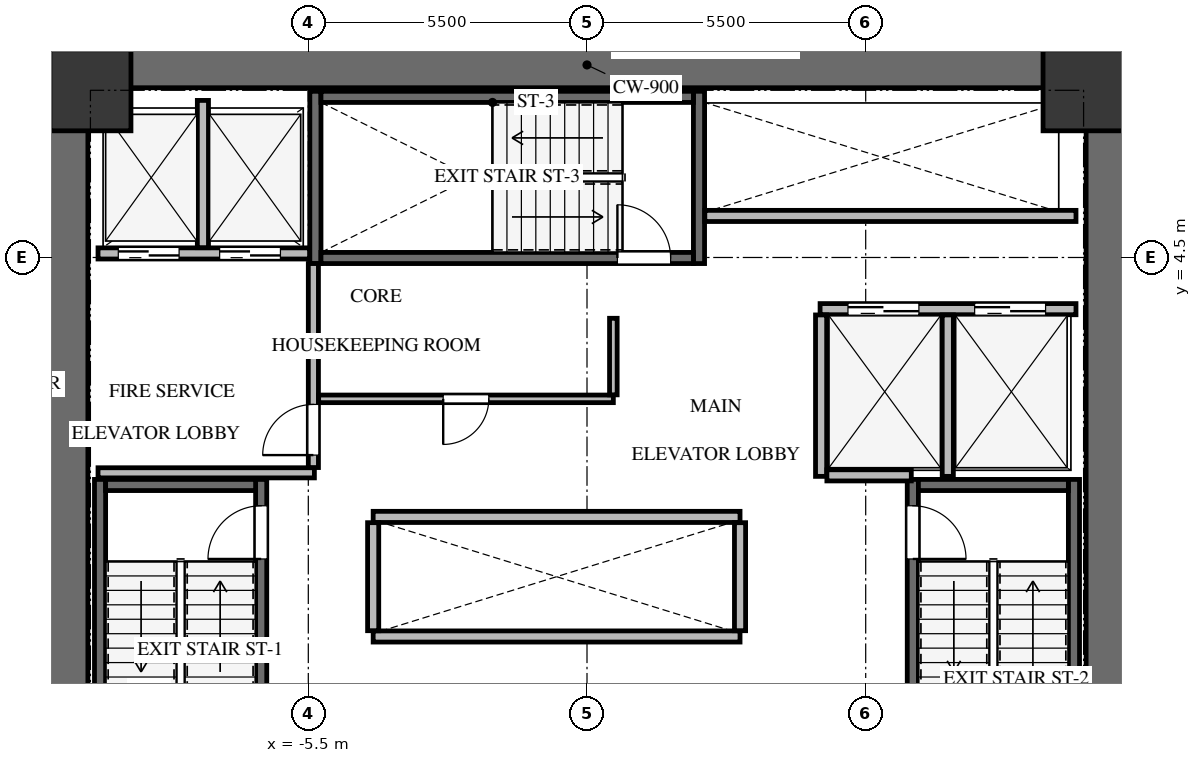
"""IFC4 building model, lengths in metres.
Left out: names, types, materials, properties, quantities, classifications, styles, units other than length and angle.
Written with IfcOpenShell. Run it as: python <this file> out.ifc"""

import sys

from ifc_helpers import new_model, si_unit, direction, frame, frame_2d, origin, origin_2d, place, context, subcontext, project, spatial, rectangle, extrude, source, transform, mapped, element, fill, save


model = new_model("IFC4")
c1 = context("Model", 3, precision=1e-05, world=origin(), true_north=direction((0.0, 1.0)))
c2 = subcontext(c1, "Body", "Model", "MODEL_VIEW")
j1 = project(units=[si_unit("LENGTHUNIT", "METRE"), si_unit("PLANEANGLEUNIT", "RADIAN")], contexts=[c1])
p1 = place(None, origin())
s1 = spatial("IfcSite", under=j1, at=p1, CompositionType="ELEMENT")
p2 = place(p1, origin())
s2 = spatial("IfcBuilding", under=s1, at=p2, CompositionType="ELEMENT")
p3 = place(p2, frame((0.0, 0.0, 45.6)))
s3 = spatial("IfcBuildingStorey", under=s2, at=p3, CompositionType="ELEMENT", Elevation=45.6)
for number, where, z_axis, x_axis in (
    (1, (-10.3, -8.75, 0.0), (0.0, 0.0, 1.0), (0.0, 1.0, 0.0)),
    (2, (10.3, -8.75, 0.0), (0.0, 0.0, 1.0), (0.0, 1.0, 0.0)),
):
    element("IfcWall", number, at=place(p3, frame(where, z_axis=z_axis, x_axis=x_axis)), inside=s3, PredefinedType="SHEAR", context=c2, shape_type="SweptSolid", body=[
        extrude(rectangle(XDim=17.5, YDim=0.9, at=frame_2d((8.75, 0.0))), origin(), (0.0, 0.0, 1.0), 3.3),
    ])
p4 = place(p3, frame((-9.85, 8.3, 0.0), z_axis=(0.0, 0.0, 1.0), x_axis=(1.0, 0.0, 0.0)))
e3 = element("IfcWall", 3, at=p4, inside=s3, PredefinedType="SHEAR", context=c2, shape_type="SweptSolid", body=[
    extrude(rectangle(XDim=19.7, YDim=0.9, at=frame_2d((9.85, 0.0))), origin(), (0.0, 0.0, 1.0), 3.3),
])
p5 = place(p3, frame((-6.43, -7.77, -0.24), z_axis=(0.0, 0.0, 1.0), x_axis=(0.0, 1.0, 0.0)))
e4 = element("IfcWall", 4, at=p5, inside=s3, PredefinedType="SHEAR", context=c2, shape_type="SweptSolid", body=[
    extrude(rectangle(XDim=7.89, YDim=0.22, at=frame_2d((3.945, 0.0))), origin(), (0.0, 0.0, 1.0), 3.3),
])
p6 = place(p5, frame((6.32, 0.0, 0.0)))
e5 = element("IfcOpeningElement", 5, at=p6, cuts=e4, PredefinedType="OPENING", context=c2, shape_type="SweptSolid", body=[
    extrude(rectangle(XDim=1.05, YDim=2.15, at=frame_2d((0.525, 1.075))), frame((0.0, 0.12, 0.0), z_axis=(0.0, -1.0, 0.0), x_axis=(1.0, 0.0, 0.0)), (0.0, 0.0, 1.0), 0.24),
])
p7 = place(p3, frame((-9.61, 0.12, -0.24), z_axis=(0.0, 0.0, 1.0), x_axis=(0.0, -1.0, 0.0)))
e6 = element("IfcWall", 6, at=p7, inside=s3, PredefinedType="SHEAR", context=c2, shape_type="SweptSolid", body=[
    extrude(rectangle(XDim=7.89, YDim=0.22, at=frame_2d((3.945, 0.0))), origin(), (0.0, 0.0, 1.0), 3.3),
])
p8 = place(p3, frame((-6.54, 0.01, -0.24), z_axis=(0.0, 0.0, 1.0), x_axis=(-1.0, 0.0, 0.0)))
e7 = element("IfcWall", 7, at=p8, inside=s3, PredefinedType="SHEAR", context=c2, shape_type="SweptSolid", body=[
    extrude(rectangle(XDim=2.96, YDim=0.22, at=frame_2d((1.48, 0.0))), origin(), (0.0, 0.0, 1.0), 3.3),
])
p9 = place(p3, frame((9.61, -7.77, -0.24), z_axis=(0.0, 0.0, 1.0), x_axis=(0.0, 1.0, 0.0)))
e8 = element("IfcWall", 8, at=p9, inside=s3, PredefinedType="SHEAR", context=c2, shape_type="SweptSolid", body=[
    extrude(rectangle(XDim=7.89, YDim=0.22, at=frame_2d((3.945, 0.0))), origin(), (0.0, 0.0, 1.0), 3.3),
])
p10 = place(p3, frame((6.43, 0.12, -0.24), z_axis=(0.0, 0.0, 1.0), x_axis=(0.0, -1.0, 0.0)))
e9 = element("IfcWall", 9, at=p10, inside=s3, PredefinedType="SHEAR", context=c2, shape_type="SweptSolid", body=[
    extrude(rectangle(XDim=7.89, YDim=0.22, at=frame_2d((3.945, 0.0))), origin(), (0.0, 0.0, 1.0), 3.3),
])
p11 = place(p10, frame((0.52, 0.0, 0.0)))
e10 = element("IfcOpeningElement", 10, at=p11, cuts=e9, PredefinedType="OPENING", context=c2, shape_type="SweptSolid", body=[
    extrude(rectangle(XDim=1.05, YDim=2.15, at=frame_2d((0.525, 1.075))), frame((0.0, 0.12, 0.0), z_axis=(0.0, -1.0, 0.0), x_axis=(1.0, 0.0, 0.0)), (0.0, 0.0, 1.0), 0.24),
])
p12 = place(p3, frame((9.5, 0.01, -0.24), z_axis=(0.0, 0.0, 1.0), x_axis=(-1.0, 0.0, 0.0)))
e11 = element("IfcWall", 11, at=p12, inside=s3, PredefinedType="SHEAR", context=c2, shape_type="SweptSolid", body=[
    extrude(rectangle(XDim=2.96, YDim=0.22, at=frame_2d((1.48, 0.0))), origin(), (0.0, 0.0, 1.0), 3.3),
])
for number, where, z_axis, x_axis in (
    (12, (2.21, 4.38, -0.24), (0.0, 0.0, 1.0), (0.0, 1.0, 0.0)),
    (13, (-5.36, 7.78, -0.24), (0.0, 0.0, 1.0), (0.0, -1.0, 0.0)),
):
    element("IfcWall", number, at=place(p3, frame(where, z_axis=z_axis, x_axis=x_axis)), inside=s3, PredefinedType="SHEAR", context=c2, shape_type="SweptSolid", body=[
        extrude(rectangle(XDim=3.4, YDim=0.22, at=frame_2d((1.7, 0.0))), origin(), (0.0, 0.0, 1.0), 3.3),
    ])
p13 = place(p3, frame((-5.25, 4.49, -0.24), z_axis=(0.0, 0.0, 1.0), x_axis=(1.0, 0.0, 0.0)))
e14 = element("IfcWall", 14, at=p13, inside=s3, PredefinedType="SHEAR", context=c2, shape_type="SweptSolid", body=[
    extrude(rectangle(XDim=7.35, YDim=0.22, at=frame_2d((3.675, 0.0))), origin(), (0.0, 0.0, 1.0), 3.3),
])
p14 = place(p13, frame((5.85, 0.0, 0.0)))
e15 = element("IfcOpeningElement", 15, at=p14, cuts=e14, PredefinedType="OPENING", context=c2, shape_type="SweptSolid", body=[
    extrude(rectangle(XDim=1.05, YDim=2.15, at=frame_2d((0.525, 1.075))), frame((0.0, 0.12, 0.0), z_axis=(0.0, -1.0, 0.0), x_axis=(1.0, 0.0, 0.0)), (0.0, 0.0, 1.0), 0.24),
])
p15 = place(p3, frame((2.1, 7.67, -0.24), z_axis=(0.0, 0.0, 1.0), x_axis=(-1.0, 0.0, 0.0)))
e16 = element("IfcWall", 16, at=p15, inside=s3, PredefinedType="SHEAR", context=c2, shape_type="SweptSolid", body=[
    extrude(rectangle(XDim=7.35, YDim=0.22, at=frame_2d((3.675, 0.0))), origin(), (0.0, 0.0, 1.0), 3.3),
])
m1 = source(origin(), c2, "Body", "SweptSolid", [
    extrude(rectangle(XDim=1.6, YDim=1.6, at=origin_2d()), origin(), (0.0, 0.0, 1.0), 3.3),
])
for number, where, z_axis, x_axis in (
    (17, (9.8, 7.8, -0.24), (0.0, 0.0, 1.0), (1.0, 0.0, 0.0)),
    (18, (-9.8, 7.8, -0.24), (0.0, 0.0, 1.0), (1.0, 0.0, 0.0)),
):
    element("IfcColumn", number, at=place(p3, frame(where, z_axis=z_axis, x_axis=x_axis)), inside=s3, PredefinedType="COLUMN", context=c2, shape_type="MappedRepresentation", body=[
        mapped(m1, transform((0.0, 0.0, 0.0), x_axis=(1.0, 0.0, 0.0), y_axis=(0.0, 1.0, 0.0), z_axis=(0.0, 0.0, 1.0), scale=1.0)),
    ])
p16 = place(p3, frame((-9.65, 4.58, 0.0), z_axis=(0.0, 0.0, 1.0), x_axis=(1.0, 0.0, 0.0)))
e19 = element("IfcWall", 19, at=p16, inside=s3, PredefinedType="SOLIDWALL", context=c2, shape_type="SweptSolid", body=[
    extrude(rectangle(XDim=4.175, YDim=0.22, at=frame_2d((2.087, 0.0))), origin(), (0.0, 0.0, 1.0), 3.045),
])
p17 = place(p16, frame((0.4, 0.0, 0.0)))
e20 = element("IfcOpeningElement", 20, at=p17, cuts=e19, PredefinedType="OPENING", context=c2, shape_type="SweptSolid", body=[
    extrude(rectangle(XDim=1.2, YDim=2.15, at=frame_2d((0.6, 1.075))), frame((0.0, 0.12, 0.0), z_axis=(0.0, -1.0, 0.0), x_axis=(1.0, 0.0, 0.0)), (0.0, 0.0, 1.0), 0.24),
])
p18 = place(p16, frame((2.4, 0.0, 0.0)))
e21 = element("IfcOpeningElement", 21, at=p18, cuts=e19, PredefinedType="OPENING", context=c2, shape_type="SweptSolid", body=[
    extrude(rectangle(XDim=1.2, YDim=2.15, at=frame_2d((0.6, 1.075))), frame((0.0, 0.12, 0.0), z_axis=(0.0, -1.0, 0.0), x_axis=(1.0, 0.0, 0.0)), (0.0, 0.0, 1.0), 0.24),
])
p19 = place(p3, frame((-7.58, 4.694, 0.0), z_axis=(0.0, 0.0, 1.0), x_axis=(0.0, 1.0, 0.0)))
e22 = element("IfcWall", 22, at=p19, inside=s3, PredefinedType="SOLIDWALL", context=c2, shape_type="SweptSolid", body=[
    extrude(rectangle(XDim=2.906, YDim=0.22, at=frame_2d((1.453, 0.0))), origin(), (0.0, 0.0, 1.0), 3.045),
])
p20 = place(p3, frame((-9.65, 0.25, 0.0), z_axis=(0.0, 0.0, 1.0), x_axis=(1.0, 0.0, 0.0)))
e23 = element("IfcWall", 23, at=p20, inside=s3, PredefinedType="SOLIDWALL", context=c2, shape_type="SweptSolid", body=[
    extrude(rectangle(XDim=4.27, YDim=0.2, at=frame_2d((2.135, 0.0))), origin(), (0.0, 0.0, 1.0), 3.045),
])
p21 = place(p3, frame((-5.4, 0.354, 0.0), z_axis=(0.0, 0.0, 1.0), x_axis=(0.0, 1.0, 0.0)))
e24 = element("IfcWall", 24, at=p21, inside=s3, PredefinedType="SOLIDWALL", context=c2, shape_type="SweptSolid", body=[
    extrude(rectangle(XDim=4.026, YDim=0.2, at=frame_2d((2.013, 0.0))), origin(), (0.0, 0.0, 1.0), 3.045),
])
p22 = place(p21, frame((0.246, 0.0, 0.0)))
e25 = element("IfcOpeningElement", 25, at=p22, cuts=e24, PredefinedType="OPENING", context=c2, shape_type="SweptSolid", body=[
    extrude(rectangle(XDim=1.0, YDim=2.15, at=frame_2d((0.5, 1.075))), frame((0.0, 0.11, 0.0), z_axis=(0.0, -1.0, 0.0), x_axis=(1.0, 0.0, 0.0)), (0.0, 0.0, 1.0), 0.22),
])
p23 = place(p3, frame((4.6, 3.48, 0.0), z_axis=(0.0, 0.0, 1.0), x_axis=(1.0, 0.0, 0.0)))
e26 = element("IfcWall", 26, at=p23, inside=s3, PredefinedType="SOLIDWALL", context=c2, shape_type="SweptSolid", body=[
    extrude(rectangle(XDim=5.05, YDim=0.22, at=frame_2d((2.525, 0.0))), origin(), (0.0, 0.0, 1.0), 3.045),
])
p24 = place(p23, frame((0.55, 0.0, 0.0)))
e27 = element("IfcOpeningElement", 27, at=p24, cuts=e26, PredefinedType="OPENING", context=c2, shape_type="SweptSolid", body=[
    extrude(rectangle(XDim=1.4, YDim=2.15, at=frame_2d((0.7, 1.075))), frame((0.0, 0.12, 0.0), z_axis=(0.0, -1.0, 0.0), x_axis=(1.0, 0.0, 0.0)), (0.0, 0.0, 1.0), 0.24),
])
p25 = place(p23, frame((3.05, 0.0, 0.0)))
e28 = element("IfcOpeningElement", 28, at=p25, cuts=e26, PredefinedType="OPENING", context=c2, shape_type="SweptSolid", body=[
    extrude(rectangle(XDim=1.4, YDim=2.15, at=frame_2d((0.7, 1.075))), frame((0.0, 0.12, 0.0), z_axis=(0.0, -1.0, 0.0), x_axis=(1.0, 0.0, 0.0)), (0.0, 0.0, 1.0), 0.24),
])
for number, where, z_axis, x_axis in (
    (29, (4.62, 0.18, 0.0), (0.0, 0.0, 1.0), (0.0, 1.0, 0.0)),
    (30, (7.12, 0.18, 0.0), (0.0, 0.0, 1.0), (0.0, 1.0, 0.0)),
):
    element("IfcWall", number, at=place(p3, frame(where, z_axis=z_axis, x_axis=x_axis)), inside=s3, PredefinedType="SOLIDWALL", context=c2, shape_type="SweptSolid", body=[
        extrude(rectangle(XDim=3.186, YDim=0.22, at=frame_2d((1.593, 0.0))), origin(), (0.0, 0.0, 1.0), 3.045),
    ])
p26 = place(p3, frame((4.734, 0.2, 0.0), z_axis=(0.0, 0.0, 1.0), x_axis=(1.0, 0.0, 0.0)))
e31 = element("IfcWall", 31, at=p26, inside=s3, PredefinedType="SOLIDWALL", context=c2, shape_type="SweptSolid", body=[
    extrude(rectangle(XDim=1.666, YDim=0.22, at=frame_2d((0.833, 0.0))), origin(), (0.0, 0.0, 1.0), 3.045),
])
for number, where, z_axis, x_axis in (
    (32, (-4.22, -2.98, 0.0), (0.0, 0.0, 1.0), (1.0, 0.0, 0.0)),
    (33, (-4.22, -0.62, 0.0), (0.0, 0.0, 1.0), (1.0, 0.0, 0.0)),
):
    element("IfcWall", number, at=place(p3, frame(where, z_axis=z_axis, x_axis=x_axis)), inside=s3, PredefinedType="SOLIDWALL", context=c2, shape_type="SweptSolid", body=[
        extrude(rectangle(XDim=7.24, YDim=0.22, at=frame_2d((3.62, 0.0))), origin(), (0.0, 0.0, 1.0), 3.045),
    ])
for number, where, z_axis, x_axis in (
    (34, (-4.22, -2.866, 0.0), (0.0, 0.0, 1.0), (0.0, 1.0, 0.0)),
    (35, (3.02, -2.866, 0.0), (0.0, 0.0, 1.0), (0.0, 1.0, 0.0)),
):
    element("IfcWall", number, at=place(p3, frame(where, z_axis=z_axis, x_axis=x_axis)), inside=s3, PredefinedType="SOLIDWALL", context=c2, shape_type="SweptSolid", body=[
        extrude(rectangle(XDim=2.132, YDim=0.22, at=frame_2d((1.066, 0.0))), origin(), (0.0, 0.0, 1.0), 3.045),
    ])
p27 = place(p3, frame((2.325, 5.32, 0.0), z_axis=(0.0, 0.0, 1.0), x_axis=(1.0, 0.0, 0.0)))
e36 = element("IfcWall", 36, at=p27, inside=s3, PredefinedType="SOLIDWALL", context=c2, shape_type="SweptSolid", body=[
    extrude(rectangle(XDim=7.325, YDim=0.22, at=frame_2d((3.663, 0.0))), origin(), (0.0, 0.0, 1.0), 3.045),
])
p28 = place(p3, frame((0.52, 1.71, 0.0), z_axis=(0.0, 0.0, 1.0), x_axis=(-1.0, 0.0, 0.0)))
e37 = element("IfcWall", 37, at=p28, inside=s3, PredefinedType="PARTITIONING", context=c2, shape_type="SweptSolid", body=[
    extrude(rectangle(XDim=5.816, YDim=0.15, at=frame_2d((2.908, 0.0))), origin(), (0.0, 0.0, 1.0), 3.045),
])
p29 = place(p28, frame((2.458, 0.0, 0.0)))
e38 = element("IfcOpeningElement", 38, at=p29, cuts=e37, PredefinedType="OPENING", context=c2, shape_type="SweptSolid", body=[
    extrude(rectangle(XDim=0.9, YDim=2.05, at=frame_2d((0.45, 1.025))), frame((0.0, 0.085, 0.0), z_axis=(0.0, -1.0, 0.0), x_axis=(1.0, 0.0, 0.0)), (0.0, 0.0, 1.0), 0.17),
])
p30 = place(p3, frame((0.52, 3.3, 0.0), z_axis=(0.0, 0.0, 1.0), x_axis=(0.0, -1.0, 0.0)))
e39 = element("IfcWall", 39, at=p30, inside=s3, PredefinedType="PARTITIONING", context=c2, shape_type="SweptSolid", body=[
    extrude(rectangle(XDim=1.511, YDim=0.15, at=frame_2d((0.755, 0.0))), origin(), (0.0, 0.0, 1.0), 3.045),
])
m2 = source(origin(), c2, "Body", "SweptSolid", [
    extrude(rectangle(XDim=1.05, YDim=2.15, at=frame_2d((0.525, 1.075))), frame((0.0, 0.025, 0.0), z_axis=(0.0, -1.0, 0.0), x_axis=(1.0, 0.0, 0.0)), (0.0, 0.0, 1.0), 0.05),
])
p31 = place(p6, origin())
e40 = element("IfcDoor", 40, at=p31, inside=s3, OperationType="SINGLE_SWING_LEFT", PredefinedType="DOOR", context=c2, shape_type="MappedRepresentation", body=[
    mapped(m2, transform((0.0, 0.0, 0.0), x_axis=(1.0, 0.0, 0.0), y_axis=(0.0, 1.0, 0.0), z_axis=(0.0, 0.0, 1.0), scale=1.0)),
])
fill(e5, e40)
m3 = source(origin(), c2, "Body", "SweptSolid", [
    extrude(rectangle(XDim=1.05, YDim=2.15, at=frame_2d((0.525, 1.075))), frame((0.0, 0.025, 0.0), z_axis=(0.0, -1.0, 0.0), x_axis=(1.0, 0.0, 0.0)), (0.0, 0.0, 1.0), 0.05),
])
p32 = place(p11, origin())
e41 = element("IfcDoor", 41, at=p32, inside=s3, OperationType="SINGLE_SWING_RIGHT", PredefinedType="DOOR", context=c2, shape_type="MappedRepresentation", body=[
    mapped(m3, transform((0.0, 0.0, 0.0), x_axis=(1.0, 0.0, 0.0), y_axis=(0.0, 1.0, 0.0), z_axis=(0.0, 0.0, 1.0), scale=1.0)),
])
fill(e10, e41)
p33 = place(p14, origin())
e42 = element("IfcDoor", 42, at=p33, inside=s3, OperationType="SINGLE_SWING_LEFT", PredefinedType="DOOR", context=c2, shape_type="MappedRepresentation", body=[
    mapped(m2, transform((0.0, 0.0, 0.0), x_axis=(1.0, 0.0, 0.0), y_axis=(0.0, 1.0, 0.0), z_axis=(0.0, 0.0, 1.0), scale=1.0)),
])
fill(e15, e42)
m4 = source(origin(), c2, "Body", "SweptSolid", [
    extrude(rectangle(XDim=1.2, YDim=2.15, at=frame_2d((0.6, 1.075))), frame((0.0, 0.025, 0.0), z_axis=(0.0, -1.0, 0.0), x_axis=(1.0, 0.0, 0.0)), (0.0, 0.0, 1.0), 0.05),
])
p34 = place(p17, origin())
e43 = element("IfcDoor", 43, at=p34, inside=s3, OperationType="DOUBLE_DOOR_SLIDING", PredefinedType="DOOR", context=c2, shape_type="MappedRepresentation", body=[
    mapped(m4, transform((0.0, 0.0, 0.0), x_axis=(1.0, 0.0, 0.0), y_axis=(0.0, 1.0, 0.0), z_axis=(0.0, 0.0, 1.0), scale=1.0)),
])
fill(e20, e43)
p35 = place(p18, origin())
e44 = element("IfcDoor", 44, at=p35, inside=s3, OperationType="DOUBLE_DOOR_SLIDING", PredefinedType="DOOR", context=c2, shape_type="MappedRepresentation", body=[
    mapped(m4, transform((0.0, 0.0, 0.0), x_axis=(1.0, 0.0, 0.0), y_axis=(0.0, 1.0, 0.0), z_axis=(0.0, 0.0, 1.0), scale=1.0)),
])
fill(e21, e44)
m5 = source(origin(), c2, "Body", "SweptSolid", [
    extrude(rectangle(XDim=1.0, YDim=2.15, at=frame_2d((0.5, 1.075))), frame((0.0, 0.025, 0.0), z_axis=(0.0, -1.0, 0.0), x_axis=(1.0, 0.0, 0.0)), (0.0, 0.0, 1.0), 0.05),
])
p36 = place(p22, origin())
e45 = element("IfcDoor", 45, at=p36, inside=s3, OperationType="SINGLE_SWING_LEFT", PredefinedType="DOOR", context=c2, shape_type="MappedRepresentation", body=[
    mapped(m5, transform((0.0, 0.0, 0.0), x_axis=(1.0, 0.0, 0.0), y_axis=(0.0, 1.0, 0.0), z_axis=(0.0, 0.0, 1.0), scale=1.0)),
])
fill(e25, e45)
m6 = source(origin(), c2, "Body", "SweptSolid", [
    extrude(rectangle(XDim=1.4, YDim=2.15, at=frame_2d((0.7, 1.075))), frame((0.0, 0.025, 0.0), z_axis=(0.0, -1.0, 0.0), x_axis=(1.0, 0.0, 0.0)), (0.0, 0.0, 1.0), 0.05),
])
p37 = place(p24, origin())
e46 = element("IfcDoor", 46, at=p37, inside=s3, OperationType="DOUBLE_DOOR_SLIDING", PredefinedType="DOOR", context=c2, shape_type="MappedRepresentation", body=[
    mapped(m6, transform((0.0, 0.0, 0.0), x_axis=(1.0, 0.0, 0.0), y_axis=(0.0, 1.0, 0.0), z_axis=(0.0, 0.0, 1.0), scale=1.0)),
])
fill(e27, e46)
p38 = place(p25, origin())
e47 = element("IfcDoor", 47, at=p38, inside=s3, OperationType="DOUBLE_DOOR_SLIDING", PredefinedType="DOOR", context=c2, shape_type="MappedRepresentation", body=[
    mapped(m6, transform((0.0, 0.0, 0.0), x_axis=(1.0, 0.0, 0.0), y_axis=(0.0, 1.0, 0.0), z_axis=(0.0, 0.0, 1.0), scale=1.0)),
])
fill(e28, e47)
m7 = source(origin(), c2, "Body", "SweptSolid", [
    extrude(rectangle(XDim=0.9, YDim=2.05, at=frame_2d((0.45, 1.025))), frame((0.0, 0.025, 0.0), z_axis=(0.0, -1.0, 0.0), x_axis=(1.0, 0.0, 0.0)), (0.0, 0.0, 1.0), 0.05),
])
p39 = place(p29, origin())
e48 = element("IfcDoor", 48, at=p39, inside=s3, OperationType="SINGLE_SWING_RIGHT", PredefinedType="DOOR", context=c2, shape_type="MappedRepresentation", body=[
    mapped(m7, transform((0.0, 0.0, 0.0), x_axis=(1.0, 0.0, 0.0), y_axis=(0.0, 1.0, 0.0), z_axis=(0.0, 0.0, 1.0), scale=1.0)),
])
fill(e38, e48)
save(model, sys.argv[1])
